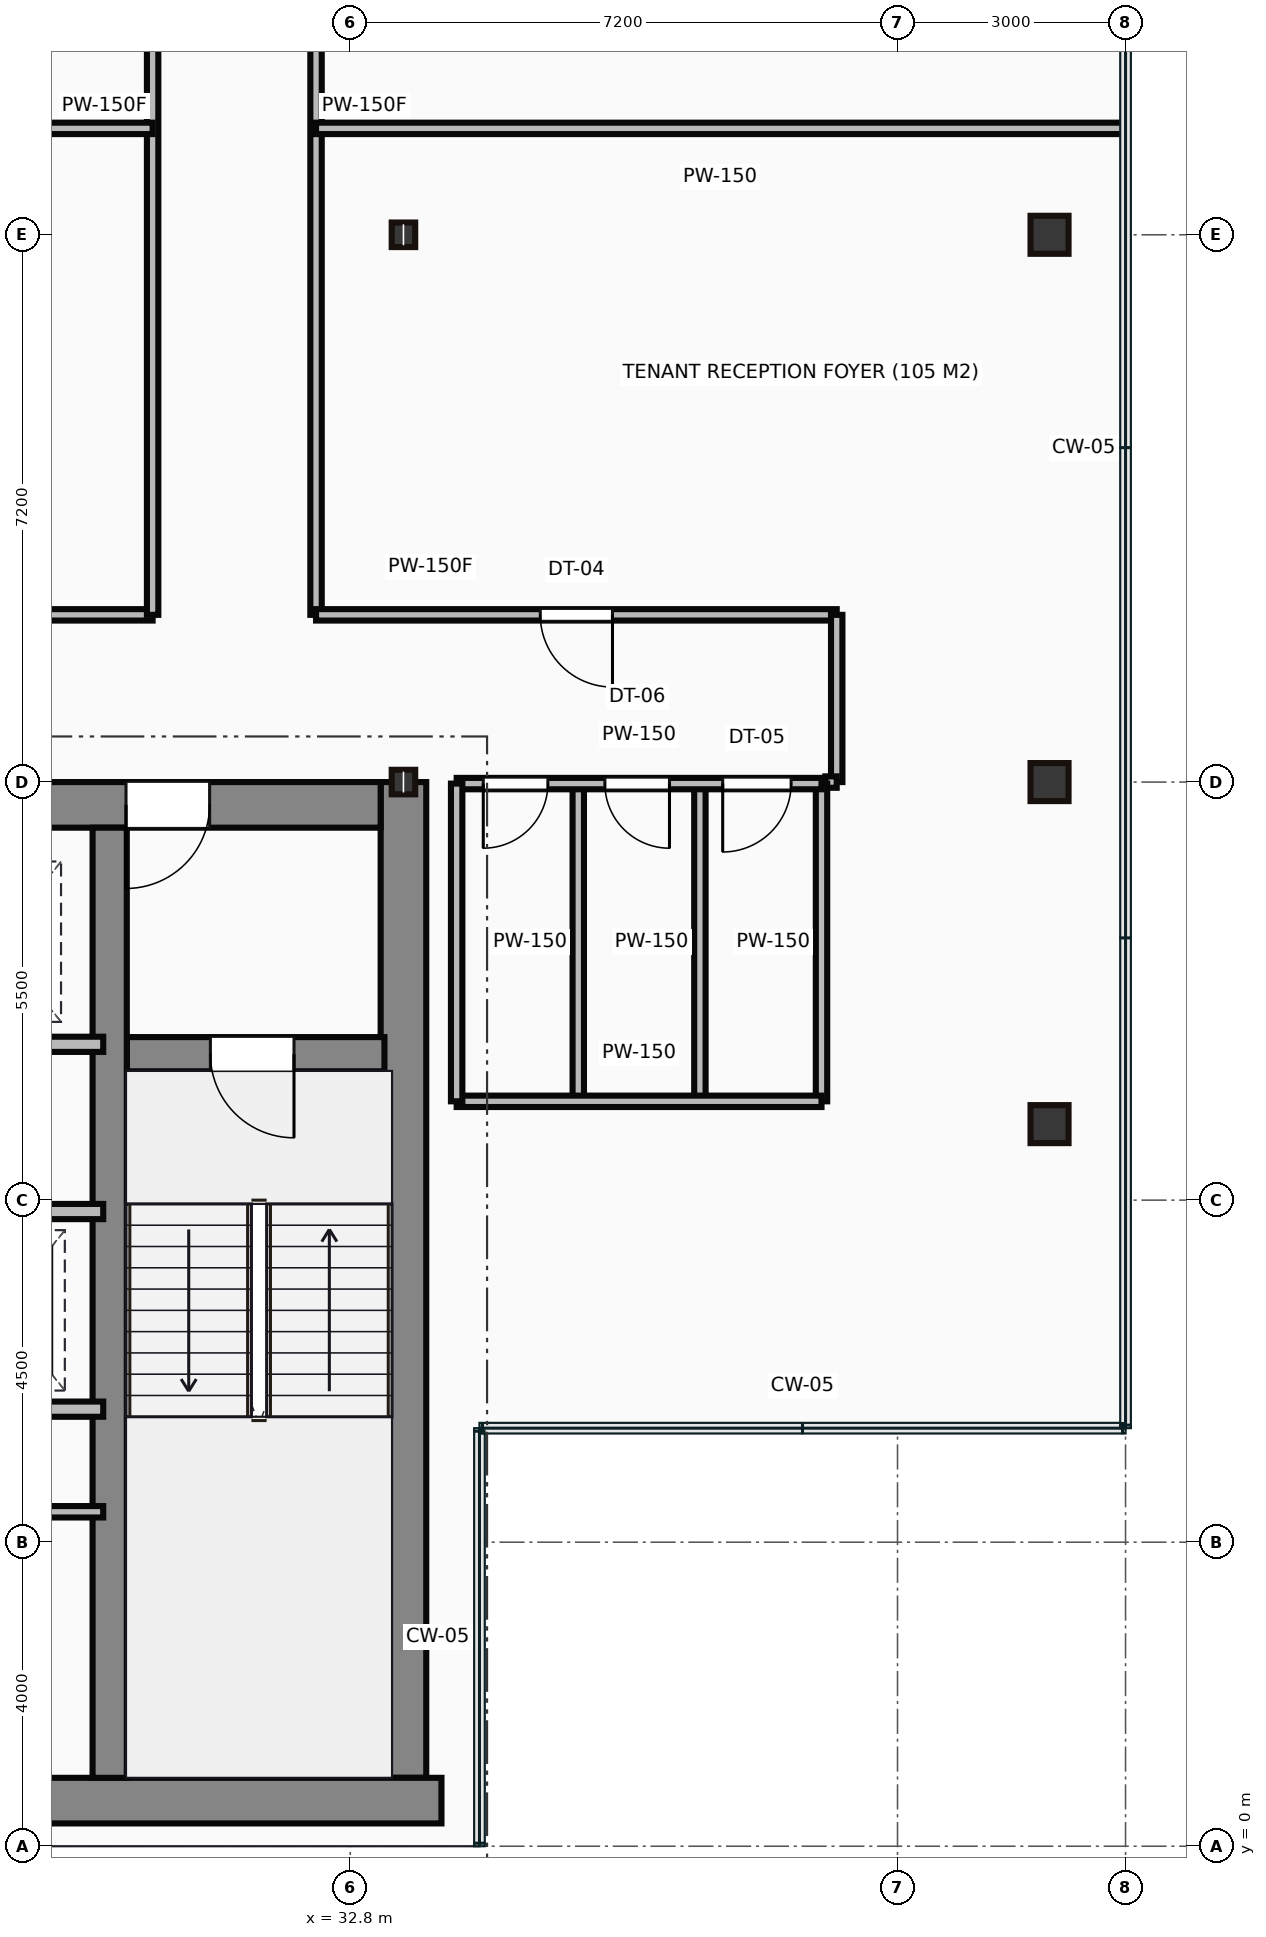
"""IFC4 building model, lengths in metres.
Left out: names, types, materials, properties, quantities, classifications, styles, units other than length and angle.
Written with IfcOpenShell. Run it as: python <this file> out.ifc"""

import sys

from ifc_helpers import new_model, si_unit, direction, frame, frame_2d, origin, origin_2d, place, context, subcontext, project, spatial, rectangle, hollow_rectangle, i_section, extrude, source, transform, mapped, element, fill, save


model = new_model("IFC4")
c1 = context("Model", 3, precision=1e-05, world=origin(), true_north=direction((0.0, 1.0)))
c2 = subcontext(c1, "Body", "Model", "MODEL_VIEW")
j1 = project(units=[si_unit("LENGTHUNIT", "METRE"), si_unit("PLANEANGLEUNIT", "RADIAN")], contexts=[c1])
p1 = place(None, origin())
s1 = spatial("IfcSite", under=j1, at=p1, CompositionType="ELEMENT")
p2 = place(p1, origin())
s2 = spatial("IfcBuilding", under=s1, at=p2, CompositionType="ELEMENT")
p3 = place(p2, frame((0.0, 0.0, 247.85)))
s3 = spatial("IfcBuildingStorey", under=s2, at=p3, CompositionType="ELEMENT", Elevation=247.85)
m1 = source(origin(), c2, "Body", "SweptSolid", [
    extrude(rectangle(XDim=29.5, YDim=0.6, at=frame_2d((14.75, 0.0))), origin(), (0.0, 0.0, 1.0), 3.65),
])
p4 = place(p3, frame((4.5, 0.6, 0.0), z_axis=(0.0, 0.0, 1.0), x_axis=(1.0, 0.0, 0.0)))
e1 = element("IfcWall", 1, at=p4, inside=s3, PredefinedType="SHEAR", context=c2, shape_type="MappedRepresentation", body=[
    mapped(m1, transform((0.0, 0.0, 0.0))),
])
m2 = source(origin(), c2, "Body", "SweptSolid", [
    extrude(rectangle(XDim=13.1, YDim=0.6, at=frame_2d((6.55, 0.0))), origin(), (0.0, 0.0, 1.0), 3.65),
])
p5 = place(p3, frame((33.5, 0.9, 0.0), z_axis=(0.0, 0.0, 1.0), x_axis=(0.0, 1.0, 0.0)))
e2 = element("IfcWall", 2, at=p5, inside=s3, PredefinedType="SHEAR", context=c2, shape_type="MappedRepresentation", body=[
    mapped(m2, transform((0.0, 0.0, 0.0))),
])
m3 = source(origin(), c2, "Body", "SweptSolid", [
    extrude(rectangle(XDim=12.6, YDim=0.6, at=frame_2d((6.3, 0.0))), origin(), (0.0, 0.0, 1.0), 3.65),
])
p6 = place(p3, frame((20.6, 13.7, 0.0), z_axis=(0.0, 0.0, 1.0), x_axis=(1.0, 0.0, 0.0)))
e3 = element("IfcWall", 3, at=p6, inside=s3, PredefinedType="SHEAR", context=c2, shape_type="MappedRepresentation", body=[
    mapped(m3, transform((0.0, 0.0, 0.0))),
])
p7 = place(p6, frame((9.25, 0.0, 0.0)))
e4 = element("IfcOpeningElement", 4, at=p7, cuts=e3, PredefinedType="OPENING", context=c2, shape_type="SweptSolid", body=[
    extrude(rectangle(XDim=1.1, YDim=2.15, at=frame_2d((0.55, 1.075))), frame((0.0, 0.31, 0.0), z_axis=(0.0, -1.0, 0.0), x_axis=(1.0, 0.0, 0.0)), (0.0, 0.0, 1.0), 0.62),
])
m4 = source(origin(), c2, "Body", "SweptSolid", [
    extrude(rectangle(XDim=12.5, YDim=0.45, at=frame_2d((6.25, 0.0))), origin(), (0.0, 0.0, 1.0), 3.65),
])
p8 = place(p3, frame((29.635, 0.9, 0.0), z_axis=(0.0, 0.0, 1.0), x_axis=(0.0, 1.0, 0.0)))
e5 = element("IfcWall", 5, at=p8, inside=s3, PredefinedType="SHEAR", context=c2, shape_type="MappedRepresentation", body=[
    mapped(m4, transform((0.0, 0.0, 0.0))),
])
m5 = source(origin(), c2, "Body", "SweptSolid", [
    extrude(rectangle(XDim=3.39, YDim=0.45, at=frame_2d((1.695, 0.0))), origin(), (0.0, 0.0, 1.0), 3.65),
])
p9 = place(p3, frame((29.86, 10.42, 0.0), z_axis=(0.0, 0.0, 1.0), x_axis=(1.0, 0.0, 0.0)))
e6 = element("IfcWall", 6, at=p9, inside=s3, PredefinedType="SHEAR", context=c2, shape_type="MappedRepresentation", body=[
    mapped(m5, transform((0.0, 0.0, 0.0))),
])
p10 = place(p9, frame((1.1, 0.0, 0.0)))
e7 = element("IfcOpeningElement", 7, at=p10, cuts=e6, PredefinedType="OPENING", context=c2, shape_type="SweptSolid", body=[
    extrude(rectangle(XDim=1.1, YDim=2.15, at=frame_2d((0.55, 1.075))), frame((0.0, 0.235, 0.0), z_axis=(0.0, -1.0, 0.0), x_axis=(1.0, 0.0, 0.0)), (0.0, 0.0, 1.0), 0.47),
])
m6 = source(origin(), c2, "Body", "SweptSolid", [
    extrude(i_section(OverallWidth=0.309, OverallDepth=0.323, WebThickness=0.014, FlangeThickness=0.023, at=origin_2d()), origin(), (0.0, 0.0, 1.0), 3.65),
])
for number, where, z_axis, x_axis in (
    (8, (33.5, 14.0, 0.0), (0.0, 0.0, 1.0), (1.0, 0.0, 0.0)),
    (9, (33.5, 21.2, 0.0), (0.0, 0.0, 1.0), (1.0, 0.0, 0.0)),
):
    element("IfcColumn", number, at=place(p3, frame(where, z_axis=z_axis, x_axis=x_axis)), inside=s3, PredefinedType="COLUMN", context=c2, shape_type="MappedRepresentation", body=[
        mapped(m6, transform((0.0, 0.0, 0.0))),
    ])
m7 = source(origin(), c2, "Body", "SweptSolid", [
    extrude(hollow_rectangle(XDim=0.5, YDim=0.5, WallThickness=0.022, at=origin_2d()), origin(), (0.0, 0.0, 1.0), 3.65),
])
for number, where, z_axis, x_axis in (
    (10, (42.0, 9.5, 0.0), (0.0, 0.0, 1.0), (1.0, 0.0, 0.0)),
    (11, (42.0, 14.0, 0.0), (0.0, 0.0, 1.0), (1.0, 0.0, 0.0)),
    (12, (42.0, 21.2, 0.0), (0.0, 0.0, 1.0), (1.0, 0.0, 0.0)),
):
    element("IfcColumn", number, at=place(p3, frame(where, z_axis=z_axis, x_axis=x_axis)), inside=s3, PredefinedType="COLUMN", context=c2, shape_type="MappedRepresentation", body=[
        mapped(m7, transform((0.0, 0.0, 0.0))),
    ])
m8 = source(origin(), c2, "Body", "SweptSolid", [
    extrude(rectangle(XDim=8.8, YDim=0.2, at=frame_2d((4.4, 0.0))), origin(), (0.0, 0.0, 1.0), 3.4),
])
p11 = place(p3, frame((20.75, 10.55, 0.0), z_axis=(0.0, 0.0, 1.0), x_axis=(1.0, 0.0, 0.0)))
e13 = element("IfcWall", 13, at=p11, inside=s3, PredefinedType="PARTITIONING", context=c2, shape_type="MappedRepresentation", body=[
    mapped(m8, transform((0.0, 0.0, 0.0))),
])
p12 = place(p11, frame((0.5, 0.0, 0.0)))
e14 = element("IfcOpeningElement", 14, at=p12, cuts=e13, PredefinedType="OPENING", context=c2, shape_type="SweptSolid", body=[
    extrude(rectangle(XDim=1.05, YDim=2.15, at=frame_2d((0.525, 1.075))), frame((0.0, 0.11, 0.0), z_axis=(0.0, -1.0, 0.0), x_axis=(1.0, 0.0, 0.0)), (0.0, 0.0, 1.0), 0.22),
])
p13 = place(p11, frame((2.6, 0.0, 0.0)))
e15 = element("IfcOpeningElement", 15, at=p13, cuts=e13, PredefinedType="OPENING", context=c2, shape_type="SweptSolid", body=[
    extrude(rectangle(XDim=1.05, YDim=2.15, at=frame_2d((0.525, 1.075))), frame((0.0, 0.11, 0.0), z_axis=(0.0, -1.0, 0.0), x_axis=(1.0, 0.0, 0.0)), (0.0, 0.0, 1.0), 0.22),
])
p14 = place(p11, frame((4.7, 0.0, 0.0)))
e16 = element("IfcOpeningElement", 16, at=p14, cuts=e13, PredefinedType="OPENING", context=c2, shape_type="SweptSolid", body=[
    extrude(rectangle(XDim=1.05, YDim=2.15, at=frame_2d((0.525, 1.075))), frame((0.0, 0.11, 0.0), z_axis=(0.0, -1.0, 0.0), x_axis=(1.0, 0.0, 0.0)), (0.0, 0.0, 1.0), 0.22),
])
p15 = place(p11, frame((6.8, 0.0, 0.0)))
e17 = element("IfcOpeningElement", 17, at=p15, cuts=e13, PredefinedType="OPENING", context=c2, shape_type="SweptSolid", body=[
    extrude(rectangle(XDim=1.05, YDim=2.15, at=frame_2d((0.525, 1.075))), frame((0.0, 0.11, 0.0), z_axis=(0.0, -1.0, 0.0), x_axis=(1.0, 0.0, 0.0)), (0.0, 0.0, 1.0), 0.22),
])
m9 = source(origin(), c2, "Body", "SweptSolid", [
    extrude(rectangle(XDim=4.55, YDim=0.2, at=frame_2d((2.275, 0.0))), origin(), (0.0, 0.0, 1.0), 3.4),
])
p16 = place(p3, frame((25.0, 8.35, 0.0), z_axis=(0.0, 0.0, 1.0), x_axis=(1.0, 0.0, 0.0)))
e18 = element("IfcWall", 18, at=p16, inside=s3, PredefinedType="PARTITIONING", context=c2, shape_type="MappedRepresentation", body=[
    mapped(m9, transform((0.0, 0.0, 0.0))),
])
p17 = place(p16, frame((0.5, 0.0, 0.0)))
e19 = element("IfcOpeningElement", 19, at=p17, cuts=e18, PredefinedType="OPENING", context=c2, shape_type="SweptSolid", body=[
    extrude(rectangle(XDim=1.05, YDim=2.15, at=frame_2d((0.525, 1.075))), frame((0.0, 0.11, 0.0), z_axis=(0.0, -1.0, 0.0), x_axis=(1.0, 0.0, 0.0)), (0.0, 0.0, 1.0), 0.22),
])
p18 = place(p16, frame((2.6, 0.0, 0.0)))
e20 = element("IfcOpeningElement", 20, at=p18, cuts=e18, PredefinedType="OPENING", context=c2, shape_type="SweptSolid", body=[
    extrude(rectangle(XDim=1.05, YDim=2.15, at=frame_2d((0.525, 1.075))), frame((0.0, 0.11, 0.0), z_axis=(0.0, -1.0, 0.0), x_axis=(1.0, 0.0, 0.0)), (0.0, 0.0, 1.0), 0.22),
])
p19 = place(p3, frame((25.0, 5.75, 0.0), z_axis=(0.0, 0.0, 1.0), x_axis=(1.0, 0.0, 0.0)))
e21 = element("IfcWall", 21, at=p19, inside=s3, PredefinedType="PARTITIONING", context=c2, shape_type="MappedRepresentation", body=[
    mapped(m9, transform((0.0, 0.0, 0.0))),
])
m10 = source(origin(), c2, "Body", "SweptSolid", [
    extrude(rectangle(XDim=4.55, YDim=0.15, at=frame_2d((2.275, 0.0))), origin(), (0.0, 0.0, 1.0), 3.4),
])
p20 = place(p3, frame((25.0, 4.4, 0.0), z_axis=(0.0, 0.0, 1.0), x_axis=(1.0, 0.0, 0.0)))
e22 = element("IfcWall", 22, at=p20, inside=s3, PredefinedType="PARTITIONING", context=c2, shape_type="MappedRepresentation", body=[
    mapped(m10, transform((0.0, 0.0, 0.0))),
])
m11 = source(origin(), c2, "Body", "SweptSolid", [
    extrude(rectangle(XDim=4.8, YDim=0.15, at=frame_2d((2.4, 0.0))), origin(), (0.0, 0.0, 1.0), 2.787),
])
p21 = place(p3, frame((34.2, 13.98, 0.0), z_axis=(0.0, 0.0, 1.0), x_axis=(1.0, 0.0, 0.0)))
e23 = element("IfcWall", 23, at=p21, inside=s3, PredefinedType="PARTITIONING", context=c2, shape_type="MappedRepresentation", body=[
    mapped(m11, transform((0.0, 0.0, 0.0))),
])
p22 = place(p21, frame((0.35, 0.0, 0.0)))
e24 = element("IfcOpeningElement", 24, at=p22, cuts=e23, PredefinedType="OPENING", context=c2, shape_type="SweptSolid", body=[
    extrude(rectangle(XDim=0.85, YDim=2.1, at=frame_2d((0.425, 1.05))), frame((0.0, 0.085, 0.0), z_axis=(0.0, -1.0, 0.0), x_axis=(1.0, 0.0, 0.0)), (0.0, 0.0, 1.0), 0.17),
])
p23 = place(p21, frame((1.95, 0.0, 0.0)))
e25 = element("IfcOpeningElement", 25, at=p23, cuts=e23, PredefinedType="OPENING", context=c2, shape_type="SweptSolid", body=[
    extrude(rectangle(XDim=0.85, YDim=2.1, at=frame_2d((0.425, 1.05))), frame((0.0, 0.085, 0.0), z_axis=(0.0, -1.0, 0.0), x_axis=(1.0, 0.0, 0.0)), (0.0, 0.0, 1.0), 0.17),
])
p24 = place(p21, frame((3.5, 0.0, 0.0)))
e26 = element("IfcOpeningElement", 26, at=p24, cuts=e23, PredefinedType="OPENING", context=c2, shape_type="SweptSolid", body=[
    extrude(rectangle(XDim=0.9, YDim=2.1, at=frame_2d((0.45, 1.05))), frame((0.0, 0.085, 0.0), z_axis=(0.0, -1.0, 0.0), x_axis=(1.0, 0.0, 0.0)), (0.0, 0.0, 1.0), 0.17),
])
m12 = source(origin(), c2, "Body", "SweptSolid", [
    extrude(rectangle(XDim=4.8, YDim=0.15, at=frame_2d((2.4, 0.0))), origin(), (0.0, 0.0, 1.0), 3.4),
])
p25 = place(p3, frame((34.2, 9.8, 0.0), z_axis=(0.0, 0.0, 1.0), x_axis=(1.0, 0.0, 0.0)))
e27 = element("IfcWall", 27, at=p25, inside=s3, PredefinedType="PARTITIONING", context=c2, shape_type="MappedRepresentation", body=[
    mapped(m12, transform((0.0, 0.0, 0.0))),
])
m13 = source(origin(), c2, "Body", "SweptSolid", [
    extrude(rectangle(XDim=4.18, YDim=0.15, at=frame_2d((2.09, 0.0))), origin(), (0.0, 0.0, 1.0), 3.4),
])
for number, where, z_axis, x_axis in (
    (28, (39.0, 9.8, 0.0), (0.0, 0.0, 1.0), (0.0, 1.0, 0.0)),
    (29, (34.2, 9.8, 0.0), (0.0, 0.0, 1.0), (0.0, 1.0, 0.0)),
    (30, (35.8, 9.8, 0.0), (0.0, 0.0, 1.0), (0.0, 1.0, 0.0)),
    (31, (37.4, 9.8, 0.0), (0.0, 0.0, 1.0), (0.0, 1.0, 0.0)),
):
    element("IfcWall", number, at=place(p3, frame(where, z_axis=z_axis, x_axis=x_axis)), inside=s3, PredefinedType="PARTITIONING", context=c2, shape_type="MappedRepresentation", body=[
        mapped(m13, transform((0.0, 0.0, 0.0))),
    ])
m14 = source(origin(), c2, "Body", "SweptSolid", [
    extrude(rectangle(XDim=13.4, YDim=0.15, at=frame_2d((6.7, 0.0))), origin(), (0.0, 0.0, 1.0), 3.4),
])
p26 = place(p3, frame((32.35, 29.6, 0.0), z_axis=(0.0, 0.0, 1.0), x_axis=(0.0, -1.0, 0.0)))
e32 = element("IfcWall", 32, at=p26, inside=s3, PredefinedType="PARTITIONING", context=c2, shape_type="MappedRepresentation", body=[
    mapped(m14, transform((0.0, 0.0, 0.0))),
])
p27 = place(p26, frame((3.155, 0.0, 0.0)))
e33 = element("IfcOpeningElement", 33, at=p27, cuts=e32, PredefinedType="OPENING", context=c2, shape_type="SweptSolid", body=[
    extrude(rectangle(XDim=0.95, YDim=2.15, at=frame_2d((0.475, 1.075))), frame((0.0, 0.085, 0.0), z_axis=(0.0, -1.0, 0.0), x_axis=(1.0, 0.0, 0.0)), (0.0, 0.0, 1.0), 0.17),
])
m15 = source(origin(), c2, "Body", "SweptSolid", [
    extrude(rectangle(XDim=6.85, YDim=0.15, at=frame_2d((3.425, 0.0))), origin(), (0.0, 0.0, 1.0), 3.4),
])
p28 = place(p3, frame((32.35, 16.2, 0.0), z_axis=(0.0, 0.0, 1.0), x_axis=(1.0, 0.0, 0.0)))
e34 = element("IfcWall", 34, at=p28, inside=s3, PredefinedType="PARTITIONING", context=c2, shape_type="MappedRepresentation", body=[
    mapped(m15, transform((0.0, 0.0, 0.0))),
])
p29 = place(p28, frame((2.95, 0.0, 0.0)))
e35 = element("IfcOpeningElement", 35, at=p29, cuts=e34, PredefinedType="OPENING", context=c2, shape_type="SweptSolid", body=[
    extrude(rectangle(XDim=0.95, YDim=2.15, at=frame_2d((0.475, 1.075))), frame((0.0, 0.085, 0.0), z_axis=(0.0, -1.0, 0.0), x_axis=(1.0, 0.0, 0.0)), (0.0, 0.0, 1.0), 0.17),
])
m16 = source(origin(), c2, "Body", "SweptSolid", [
    extrude(rectangle(XDim=2.2, YDim=0.15, at=frame_2d((1.1, 0.0))), origin(), (0.0, 0.0, 1.0), 3.4),
])
p30 = place(p3, frame((39.2, 16.2, 0.0), z_axis=(0.0, 0.0, 1.0), x_axis=(0.0, -1.0, 0.0)))
e36 = element("IfcWall", 36, at=p30, inside=s3, PredefinedType="PARTITIONING", context=c2, shape_type="MappedRepresentation", body=[
    mapped(m16, transform((0.0, 0.0, 0.0))),
])
m17 = source(origin(), c2, "Body", "SweptSolid", [
    extrude(rectangle(XDim=0.15, YDim=0.15, at=frame_2d((0.075, 0.0))), origin(), (0.0, 0.0, 1.0), 3.4),
])
p31 = place(p3, frame((39.2, 14.0, 0.0), z_axis=(0.0, 0.0, 1.0), x_axis=(-1.0, 0.0, 0.0)))
e37 = element("IfcWall", 37, at=p31, inside=s3, PredefinedType="PARTITIONING", context=c2, shape_type="MappedRepresentation", body=[
    mapped(m17, transform((0.0, 0.0, 0.0))),
])
m18 = source(origin(), c2, "Body", "SweptSolid", [
    extrude(rectangle(XDim=11.25, YDim=0.15, at=frame_2d((5.625, 0.0))), origin(), (0.0, 0.0, 1.0), 3.4),
])
p32 = place(p3, frame((18.95, 16.2, 0.0), z_axis=(0.0, 0.0, 1.0), x_axis=(1.0, 0.0, 0.0)))
e38 = element("IfcWall", 38, at=p32, inside=s3, PredefinedType="PARTITIONING", context=c2, shape_type="MappedRepresentation", body=[
    mapped(m18, transform((0.0, 0.0, 0.0))),
])
p33 = place(p32, frame((5.15, 0.0, 0.0)))
e39 = element("IfcOpeningElement", 39, at=p33, cuts=e38, PredefinedType="OPENING", context=c2, shape_type="SweptSolid", body=[
    extrude(rectangle(XDim=0.95, YDim=2.15, at=frame_2d((0.475, 1.075))), frame((0.0, 0.085, 0.0), z_axis=(0.0, -1.0, 0.0), x_axis=(1.0, 0.0, 0.0)), (0.0, 0.0, 1.0), 0.17),
])
p34 = place(p3, frame((30.2, 16.2, 0.0), z_axis=(0.0, 0.0, 1.0), x_axis=(0.0, 1.0, 0.0)))
e40 = element("IfcWall", 40, at=p34, inside=s3, PredefinedType="PARTITIONING", context=c2, shape_type="MappedRepresentation", body=[
    mapped(m14, transform((0.0, 0.0, 0.0))),
])
m19 = source(origin(), c2, "Body", "SweptSolid", [
    extrude(rectangle(XDim=10.4, YDim=0.15, at=frame_2d((5.2, 0.0))), origin(), (0.0, 0.0, 1.0), 3.4),
])
p35 = place(p3, frame((19.8, 22.6, 0.0), z_axis=(0.0, 0.0, 1.0), x_axis=(1.0, 0.0, 0.0)))
e41 = element("IfcWall", 41, at=p35, inside=s3, PredefinedType="PARTITIONING", context=c2, shape_type="MappedRepresentation", body=[
    mapped(m19, transform((0.0, 0.0, 0.0))),
])
m20 = source(origin(), c2, "Body", "SweptSolid", [
    extrude(rectangle(XDim=10.63, YDim=0.15, at=frame_2d((5.315, 0.0))), origin(), (0.0, 0.0, 1.0), 3.4),
])
p36 = place(p3, frame((42.98, 22.6, 0.0), z_axis=(0.0, 0.0, 1.0), x_axis=(-1.0, 0.0, 0.0)))
e42 = element("IfcWall", 42, at=p36, inside=s3, PredefinedType="PARTITIONING", context=c2, shape_type="MappedRepresentation", body=[
    mapped(m20, transform((0.0, 0.0, 0.0))),
])
m21 = source(origin(), c2, "Body", "SweptSolid", [
    extrude(rectangle(XDim=1.1, YDim=2.15, at=frame_2d((0.55, 1.075))), frame((0.0, 0.025, 0.0), z_axis=(0.0, -1.0, 0.0), x_axis=(1.0, 0.0, 0.0)), (0.0, 0.0, 1.0), 0.05),
])
p37 = place(p10, frame((1.1, 0.0, 0.0), z_axis=(0.0, 0.0, 1.0), x_axis=(-1.0, 0.0, 0.0)))
e43 = element("IfcDoor", 43, at=p37, inside=s3, OperationType="SINGLE_SWING_RIGHT", PredefinedType="DOOR", context=c2, shape_type="MappedRepresentation", body=[
    mapped(m21, transform((0.0, 0.0, 0.0))),
])
fill(e7, e43)
p38 = place(p7, origin())
e44 = element("IfcDoor", 44, at=p38, inside=s3, OperationType="SINGLE_SWING_LEFT", PredefinedType="DOOR", context=c2, shape_type="MappedRepresentation", body=[
    mapped(m21, transform((0.0, 0.0, 0.0))),
])
fill(e4, e44)
m22 = source(origin(), c2, "Body", "SweptSolid", [
    extrude(rectangle(XDim=0.85, YDim=2.1, at=frame_2d((0.425, 1.05))), frame((0.0, 0.025, 0.0), z_axis=(0.0, -1.0, 0.0), x_axis=(1.0, 0.0, 0.0)), (0.0, 0.0, 1.0), 0.05),
])
p39 = place(p22, frame((0.85, 0.0, 0.0), z_axis=(0.0, 0.0, 1.0), x_axis=(-1.0, 0.0, 0.0)))
e45 = element("IfcDoor", 45, at=p39, inside=s3, OperationType="SINGLE_SWING_LEFT", PredefinedType="DOOR", context=c2, shape_type="MappedRepresentation", body=[
    mapped(m22, transform((0.0, 0.0, 0.0))),
])
fill(e24, e45)
p40 = place(p23, frame((0.85, 0.0, 0.0), z_axis=(0.0, 0.0, 1.0), x_axis=(-1.0, 0.0, 0.0)))
e46 = element("IfcDoor", 46, at=p40, inside=s3, OperationType="SINGLE_SWING_RIGHT", PredefinedType="DOOR", context=c2, shape_type="MappedRepresentation", body=[
    mapped(m22, transform((0.0, 0.0, 0.0))),
])
fill(e25, e46)
m23 = source(origin(), c2, "Body", "SweptSolid", [
    extrude(rectangle(XDim=0.9, YDim=2.1, at=frame_2d((0.45, 1.05))), frame((0.0, 0.025, 0.0), z_axis=(0.0, -1.0, 0.0), x_axis=(1.0, 0.0, 0.0)), (0.0, 0.0, 1.0), 0.05),
])
p41 = place(p24, frame((0.9, 0.0, 0.0), z_axis=(0.0, 0.0, 1.0), x_axis=(-1.0, 0.0, 0.0)))
e47 = element("IfcDoor", 47, at=p41, inside=s3, OperationType="SINGLE_SWING_LEFT", PredefinedType="DOOR", context=c2, shape_type="MappedRepresentation", body=[
    mapped(m23, transform((0.0, 0.0, 0.0))),
])
fill(e26, e47)
m24 = source(origin(), c2, "Body", "SweptSolid", [
    extrude(rectangle(XDim=0.95, YDim=2.15, at=frame_2d((0.475, 1.075))), frame((0.0, 0.025, 0.0), z_axis=(0.0, -1.0, 0.0), x_axis=(1.0, 0.0, 0.0)), (0.0, 0.0, 1.0), 0.05),
])
p42 = place(p29, origin())
e48 = element("IfcDoor", 48, at=p42, inside=s3, OperationType="SINGLE_SWING_RIGHT", PredefinedType="DOOR", context=c2, shape_type="MappedRepresentation", body=[
    mapped(m24, transform((0.0, 0.0, 0.0))),
])
fill(e35, e48)
save(model, sys.argv[1])
